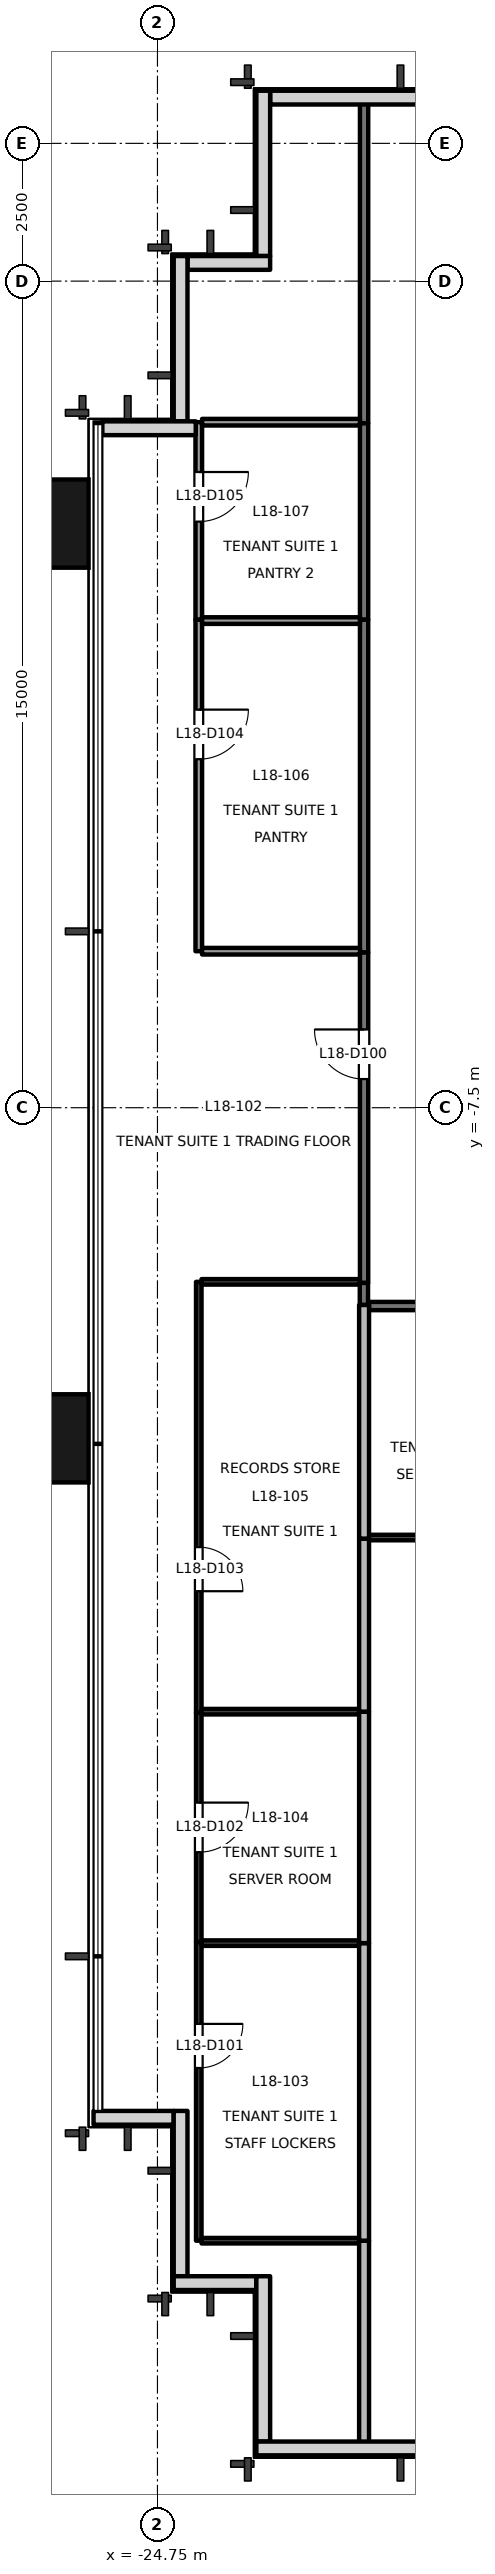
"""IFC4 building model, lengths in metres.
Left out: names, types, materials, properties, quantities, classifications, styles, units other than length and angle.
Written with IfcOpenShell. Run it as: python <this file> out.ifc"""

import sys

from ifc_helpers import new_model, si_unit, direction, frame, frame_2d, origin, origin_2d, place, context, subcontext, project, spatial, rectangle, extrude, element, fill, save


model = new_model("IFC4")
c1 = context("Model", 3, precision=1e-05, world=origin(), true_north=direction((0.0, 1.0)))
c2 = subcontext(c1, "Body", "Model", "MODEL_VIEW")
j1 = project(units=[si_unit("LENGTHUNIT", "METRE"), si_unit("PLANEANGLEUNIT", "RADIAN")], contexts=[c1])
p1 = place(None, origin())
s1 = spatial("IfcSite", under=j1, at=p1, CompositionType="ELEMENT")
p2 = place(p1, origin())
s2 = spatial("IfcBuilding", under=s1, at=p2, CompositionType="ELEMENT")
p3 = place(p2, frame((0.0, 0.0, 83.7)))
s3 = spatial("IfcBuildingStorey", under=s2, at=p3, CompositionType="ELEMENT", Elevation=83.7)
for number, where, z_axis, x_axis in (
    (1, (-26.9, -13.5, -0.2), (0.0, 0.0, 1.0), (0.0, 1.0, 0.0)),
    (2, (-26.9, 3.1, -0.2), (0.0, 0.0, 1.0), (0.0, 1.0, 0.0)),
):
    element("IfcColumn", number, at=place(p3, frame(where, z_axis=z_axis, x_axis=x_axis)), inside=s3, PredefinedType="COLUMN", context=c2, shape_type="SweptSolid", body=[
        extrude(rectangle(XDim=1.6, YDim=1.8, at=origin_2d()), origin(), (0.0, 0.0, 1.0), 4.0),
    ])
p4 = place(p3, frame((-20.0, 10.83, 0.0), z_axis=(0.0, 0.0, 1.0), x_axis=(-1.0, 0.0, 0.0)))
e3 = element("IfcWall", 3, at=p4, inside=s3, PredefinedType="SOLIDWALL", context=c2, shape_type="SweptSolid", body=[
    extrude(rectangle(XDim=2.705, YDim=0.25, at=frame_2d((1.353, 0.0))), origin(), (0.0, 0.0, 1.0), 3.8),
])
p5 = place(p3, frame((-22.83, 10.955, 0.0), z_axis=(0.0, 0.0, 1.0), x_axis=(0.0, -1.0, 0.0)))
e4 = element("IfcWall", 4, at=p5, inside=s3, PredefinedType="SOLIDWALL", context=c2, shape_type="SweptSolid", body=[
    extrude(rectangle(XDim=3.0, YDim=0.25, at=frame_2d((1.5, 0.0))), origin(), (0.0, 0.0, 1.0), 3.8),
])
p6 = place(p3, frame((-22.705, 7.83, 0.0), z_axis=(0.0, 0.0, 1.0), x_axis=(-1.0, 0.0, 0.0)))
e5 = element("IfcWall", 5, at=p6, inside=s3, PredefinedType="SOLIDWALL", context=c2, shape_type="SweptSolid", body=[
    extrude(rectangle(XDim=1.5, YDim=0.25, at=frame_2d((0.75, 0.0))), origin(), (0.0, 0.0, 1.0), 3.8),
])
p7 = place(p3, frame((-24.33, 7.955, 0.0), z_axis=(0.0, 0.0, 1.0), x_axis=(0.0, -1.0, 0.0)))
e6 = element("IfcWall", 6, at=p7, inside=s3, PredefinedType="SOLIDWALL", context=c2, shape_type="SweptSolid", body=[
    extrude(rectangle(XDim=3.0, YDim=0.25, at=frame_2d((1.5, 0.0))), origin(), (0.0, 0.0, 1.0), 3.8),
])
p8 = place(p3, frame((-24.055, 4.83, 0.0), z_axis=(0.0, 0.0, 1.0), x_axis=(-1.0, 0.0, 0.0)))
e7 = element("IfcWall", 7, at=p8, inside=s3, PredefinedType="SOLIDWALL", context=c2, shape_type="SweptSolid", body=[
    extrude(rectangle(XDim=1.695, YDim=0.25, at=frame_2d((0.848, 0.0))), origin(), (0.0, 0.0, 1.0), 3.8),
])
p9 = place(p3, frame((-25.91, -25.83, 0.0), z_axis=(0.0, 0.0, 1.0), x_axis=(1.0, 0.0, 0.0)))
e8 = element("IfcWall", 8, at=p9, inside=s3, PredefinedType="SOLIDWALL", context=c2, shape_type="SweptSolid", body=[
    extrude(rectangle(XDim=1.455, YDim=0.25, at=frame_2d((0.728, 0.0))), origin(), (0.0, 0.0, 1.0), 3.8),
])
p10 = place(p3, frame((-24.33, -25.705, 0.0), z_axis=(0.0, 0.0, 1.0), x_axis=(0.0, -1.0, 0.0)))
e9 = element("IfcWall", 9, at=p10, inside=s3, PredefinedType="SOLIDWALL", context=c2, shape_type="SweptSolid", body=[
    extrude(rectangle(XDim=3.0, YDim=0.25, at=frame_2d((1.5, 0.0))), origin(), (0.0, 0.0, 1.0), 3.8),
])
p11 = place(p3, frame((-24.455, -28.83, 0.0), z_axis=(0.0, 0.0, 1.0), x_axis=(1.0, 0.0, 0.0)))
e10 = element("IfcWall", 10, at=p11, inside=s3, PredefinedType="SOLIDWALL", context=c2, shape_type="SweptSolid", body=[
    extrude(rectangle(XDim=1.5, YDim=0.25, at=frame_2d((0.75, 0.0))), origin(), (0.0, 0.0, 1.0), 3.8),
])
p12 = place(p3, frame((-22.83, -28.705, 0.0), z_axis=(0.0, 0.0, 1.0), x_axis=(0.0, -1.0, 0.0)))
e11 = element("IfcWall", 11, at=p12, inside=s3, PredefinedType="SOLIDWALL", context=c2, shape_type="SweptSolid", body=[
    extrude(rectangle(XDim=3.0, YDim=0.25, at=frame_2d((1.5, 0.0))), origin(), (0.0, 0.0, 1.0), 3.8),
])
p13 = place(p3, frame((-22.955, -31.83, 0.0), z_axis=(0.0, 0.0, 1.0), x_axis=(1.0, 0.0, 0.0)))
e12 = element("IfcWall", 12, at=p13, inside=s3, PredefinedType="SOLIDWALL", context=c2, shape_type="SweptSolid", body=[
    extrude(rectangle(XDim=2.955, YDim=0.25, at=frame_2d((1.478, 0.0))), origin(), (0.0, 0.0, 1.0), 3.8),
])
p14 = place(p3, frame((-21.0, -10.68, 0.0), z_axis=(0.0, 0.0, 1.0), x_axis=(0.0, 1.0, 0.0)))
e13 = element("IfcWall", 13, at=p14, inside=s3, PredefinedType="PARTITIONING", context=c2, shape_type="SweptSolid", body=[
    extrude(rectangle(XDim=6.0, YDim=0.15, at=frame_2d((3.0, 0.0))), origin(), (0.0, 0.0, 1.0), 3.8),
])
p15 = place(p14, frame((3.7, 0.0, 0.0)))
e14 = element("IfcOpeningElement", 14, at=p15, cuts=e13, PredefinedType="OPENING", context=c2, shape_type="SweptSolid", body=[
    extrude(rectangle(XDim=0.9, YDim=2.1, at=frame_2d((0.45, 1.05))), frame((0.0, 0.085, 0.0), z_axis=(0.0, -1.0, 0.0), x_axis=(1.0, 0.0, 0.0)), (0.0, 0.0, 1.0), 0.171),
])
p16 = place(p3, frame((-21.0, 4.92, 0.0), z_axis=(0.0, 0.0, 1.0), x_axis=(0.0, 1.0, 0.0)))
e15 = element("IfcWall", 15, at=p16, inside=s3, PredefinedType="PARTITIONING", context=c2, shape_type="SweptSolid", body=[
    extrude(rectangle(XDim=5.82, YDim=0.15, at=frame_2d((2.91, 0.0))), origin(), (0.0, 0.0, 1.0), 3.8),
])
p17 = place(p3, frame((-21.003, -11.08, 0.0), z_axis=(0.0, 0.0, 1.0), x_axis=(0.0, 1.0, 0.0)))
e16 = element("IfcWall", 16, at=p17, inside=s3, PredefinedType="PARTITIONING", context=c2, shape_type="SweptSolid", body=[
    extrude(rectangle(XDim=0.4, YDim=0.15, at=frame_2d((0.2, 0.0))), origin(), (0.0, 0.0, 1.0), 3.8),
])
p18 = place(p3, frame((-21.0, -4.68, 0.0), z_axis=(0.0, 0.0, 1.0), x_axis=(0.0, 1.0, 0.0)))
e17 = element("IfcWall", 17, at=p18, inside=s3, PredefinedType="PARTITIONING", context=c2, shape_type="SweptSolid", body=[
    extrude(rectangle(XDim=6.04, YDim=0.15, at=frame_2d((3.02, 0.0))), origin(), (0.0, 0.0, 1.0), 3.4),
])
p19 = place(p3, frame((-21.0, 1.36, 0.0), z_axis=(0.0, 0.0, 1.0), x_axis=(0.0, 1.0, 0.0)))
e18 = element("IfcWall", 18, at=p19, inside=s3, PredefinedType="PARTITIONING", context=c2, shape_type="SweptSolid", body=[
    extrude(rectangle(XDim=3.56, YDim=0.15, at=frame_2d((1.78, 0.0))), origin(), (0.0, 0.0, 1.0), 3.4),
])
p20 = place(p3, frame((-18.02, -11.099, 0.0), z_axis=(0.0, 0.0, 1.0), x_axis=(-1.0, 0.0, 0.0)))
e19 = element("IfcWall", 19, at=p20, inside=s3, PredefinedType="PARTITIONING", context=c2, shape_type="SweptSolid", body=[
    extrude(rectangle(XDim=2.89, YDim=0.15, at=frame_2d((1.445, 0.0))), origin(), (0.0, 0.0, 1.0), 3.8),
])
p21 = place(p3, frame((-24.0, -22.64, 0.0), z_axis=(0.0, 0.0, 1.0), x_axis=(0.0, -1.0, 0.0)))
e20 = element("IfcWall", 20, at=p21, inside=s3, PredefinedType="PARTITIONING", context=c2, shape_type="SweptSolid", body=[
    extrude(rectangle(XDim=5.42, YDim=0.1, at=frame_2d((2.71, 0.0))), origin(), (0.0, 0.0, 1.0), 3.8),
])
p22 = place(p21, frame((1.486, 0.0, 0.0)))
e21 = element("IfcOpeningElement", 21, at=p22, cuts=e20, PredefinedType="OPENING", context=c2, shape_type="SweptSolid", body=[
    extrude(rectangle(XDim=0.8, YDim=2.1, at=frame_2d((0.4, 1.05))), frame((0.0, 0.061, 0.0), z_axis=(0.0, -1.0, 0.0), x_axis=(1.0, 0.0, 0.0)), (0.0, 0.0, 1.0), 0.121),
])
p23 = place(p3, frame((-23.95, -28.06, 0.0), z_axis=(0.0, 0.0, 1.0), x_axis=(1.0, 0.0, 0.0)))
e22 = element("IfcWall", 22, at=p23, inside=s3, PredefinedType="PARTITIONING", context=c2, shape_type="SweptSolid", body=[
    extrude(rectangle(XDim=2.86, YDim=0.1, at=frame_2d((1.43, 0.0))), origin(), (0.0, 0.0, 1.0), 3.8),
])
p24 = place(p3, frame((-24.0, -18.48, 0.0), z_axis=(0.0, 0.0, 1.0), x_axis=(0.0, -1.0, 0.0)))
e23 = element("IfcWall", 23, at=p24, inside=s3, PredefinedType="PARTITIONING", context=c2, shape_type="SweptSolid", body=[
    extrude(rectangle(XDim=4.16, YDim=0.1, at=frame_2d((2.08, 0.0))), origin(), (0.0, 0.0, 1.0), 3.8),
])
p25 = place(p24, frame((1.63, 0.0, 0.0)))
e24 = element("IfcOpeningElement", 24, at=p25, cuts=e23, PredefinedType="OPENING", context=c2, shape_type="SweptSolid", body=[
    extrude(rectangle(XDim=0.9, YDim=2.1, at=frame_2d((0.45, 1.05))), frame((0.0, 0.061, 0.0), z_axis=(0.0, -1.0, 0.0), x_axis=(1.0, 0.0, 0.0)), (0.0, 0.0, 1.0), 0.121),
])
p26 = place(p3, frame((-24.0, -10.66, 0.0), z_axis=(0.0, 0.0, 1.0), x_axis=(0.0, -1.0, 0.0)))
e25 = element("IfcWall", 25, at=p26, inside=s3, PredefinedType="PARTITIONING", context=c2, shape_type="SweptSolid", body=[
    extrude(rectangle(XDim=7.82, YDim=0.1, at=frame_2d((3.91, 0.0))), origin(), (0.0, 0.0, 1.0), 3.8),
])
p27 = place(p26, frame((4.814, 0.0, 0.0)))
e26 = element("IfcOpeningElement", 26, at=p27, cuts=e25, PredefinedType="OPENING", context=c2, shape_type="SweptSolid", body=[
    extrude(rectangle(XDim=0.8, YDim=2.1, at=frame_2d((0.4, 1.05))), frame((0.0, 0.061, 0.0), z_axis=(0.0, -1.0, 0.0), x_axis=(1.0, 0.0, 0.0)), (0.0, 0.0, 1.0), 0.121),
])
p28 = place(p3, frame((-21.075, -10.66, 0.0), z_axis=(0.0, 0.0, 1.0), x_axis=(-1.0, 0.0, 0.0)))
e27 = element("IfcWall", 27, at=p28, inside=s3, PredefinedType="PARTITIONING", context=c2, shape_type="SweptSolid", body=[
    extrude(rectangle(XDim=2.875, YDim=0.1, at=frame_2d((1.438, 0.0))), origin(), (0.0, 0.0, 1.0), 3.8),
])
p29 = place(p3, frame((-24.0, 1.36, 0.0), z_axis=(0.0, 0.0, 1.0), x_axis=(0.0, -1.0, 0.0)))
e28 = element("IfcWall", 28, at=p29, inside=s3, PredefinedType="PARTITIONING", context=c2, shape_type="SweptSolid", body=[
    extrude(rectangle(XDim=6.02, YDim=0.12, at=frame_2d((3.01, 0.0))), origin(), (0.0, 0.0, 1.0), 3.4),
])
p30 = place(p29, frame((1.636, 0.0, 0.0)))
e29 = element("IfcOpeningElement", 29, at=p30, cuts=e28, PredefinedType="OPENING", context=c2, shape_type="SweptSolid", body=[
    extrude(rectangle(XDim=0.9, YDim=2.1, at=frame_2d((0.45, 1.05))), frame((0.0, 0.071, 0.0), z_axis=(0.0, -1.0, 0.0), x_axis=(1.0, 0.0, 0.0)), (0.0, 0.0, 1.0), 0.141),
])
p31 = place(p3, frame((-23.94, -4.66, 0.0), z_axis=(0.0, 0.0, 1.0), x_axis=(1.0, 0.0, 0.0)))
e30 = element("IfcWall", 30, at=p31, inside=s3, PredefinedType="PARTITIONING", context=c2, shape_type="SweptSolid", body=[
    extrude(rectangle(XDim=2.865, YDim=0.12, at=frame_2d((1.433, 0.0))), origin(), (0.0, 0.0, 1.0), 3.8),
])
p32 = place(p3, frame((-24.0, 4.94, 0.0), z_axis=(0.0, 0.0, 1.0), x_axis=(0.0, -1.0, 0.0)))
e31 = element("IfcWall", 31, at=p32, inside=s3, PredefinedType="PARTITIONING", context=c2, shape_type="SweptSolid", body=[
    extrude(rectangle(XDim=3.58, YDim=0.12, at=frame_2d((1.79, 0.0))), origin(), (0.0, 0.0, 1.0), 3.4),
])
p33 = place(p32, frame((0.904, 0.0, 0.0)))
e32 = element("IfcOpeningElement", 32, at=p33, cuts=e31, PredefinedType="OPENING", context=c2, shape_type="SweptSolid", body=[
    extrude(rectangle(XDim=0.9, YDim=2.1, at=frame_2d((0.45, 1.05))), frame((0.0, 0.071, 0.0), z_axis=(0.0, -1.0, 0.0), x_axis=(1.0, 0.0, 0.0)), (0.0, 0.0, 1.0), 0.141),
])
p34 = place(p3, frame((-21.075, 4.94, 0.0), z_axis=(0.0, 0.0, 1.0), x_axis=(-1.0, 0.0, 0.0)))
e33 = element("IfcWall", 33, at=p34, inside=s3, PredefinedType="PARTITIONING", context=c2, shape_type="SweptSolid", body=[
    extrude(rectangle(XDim=2.865, YDim=0.12, at=frame_2d((1.433, 0.0))), origin(), (0.0, 0.0, 1.0), 3.8),
])
p35 = place(p3, frame((-21.0, -28.06, 0.0), z_axis=(0.0, 0.0, 1.0), x_axis=(0.0, -1.0, 0.0)))
e34 = element("IfcWall", 34, at=p35, inside=s3, PredefinedType="PARTITIONING", context=c2, shape_type="SweptSolid", body=[
    extrude(rectangle(XDim=3.68, YDim=0.18, at=frame_2d((1.84, 0.0))), origin(), (0.0, 0.0, 1.0), 3.8),
])
p36 = place(p3, frame((-23.95, -22.66, 0.0), z_axis=(0.0, 0.0, 1.0), x_axis=(1.0, 0.0, 0.0)))
e35 = element("IfcWall", 35, at=p36, inside=s3, PredefinedType="PARTITIONING", context=c2, shape_type="SweptSolid", body=[
    extrude(rectangle(XDim=2.86, YDim=0.1, at=frame_2d((1.43, 0.0))), origin(), (0.0, 0.0, 1.0), 3.8),
])
p37 = place(p3, frame((-21.0, -22.66, 0.0), z_axis=(0.0, 0.0, 1.0), x_axis=(0.0, -1.0, 0.0)))
e36 = element("IfcWall", 36, at=p37, inside=s3, PredefinedType="PARTITIONING", context=c2, shape_type="SweptSolid", body=[
    extrude(rectangle(XDim=5.4, YDim=0.18, at=frame_2d((2.7, 0.0))), origin(), (0.0, 0.0, 1.0), 3.8),
])
p38 = place(p3, frame((-23.95, -18.46, 0.0), z_axis=(0.0, 0.0, 1.0), x_axis=(1.0, 0.0, 0.0)))
e37 = element("IfcWall", 37, at=p38, inside=s3, PredefinedType="PARTITIONING", context=c2, shape_type="SweptSolid", body=[
    extrude(rectangle(XDim=2.86, YDim=0.1, at=frame_2d((1.43, 0.0))), origin(), (0.0, 0.0, 1.0), 3.8),
])
p39 = place(p3, frame((-21.0, -18.46, 0.0), z_axis=(0.0, 0.0, 1.0), x_axis=(0.0, -1.0, 0.0)))
e38 = element("IfcWall", 38, at=p39, inside=s3, PredefinedType="PARTITIONING", context=c2, shape_type="SweptSolid", body=[
    extrude(rectangle(XDim=4.2, YDim=0.18, at=frame_2d((2.1, 0.0))), origin(), (0.0, 0.0, 1.0), 3.8),
])
p40 = place(p3, frame((-21.0, -15.32, 0.0), z_axis=(0.0, 0.0, 1.0), x_axis=(0.0, -1.0, 0.0)))
e39 = element("IfcWall", 39, at=p40, inside=s3, PredefinedType="PARTITIONING", context=c2, shape_type="SweptSolid", body=[
    extrude(rectangle(XDim=3.14, YDim=0.18, at=frame_2d((1.57, 0.0))), origin(), (0.0, 0.0, 1.0), 3.8),
])
p41 = place(p3, frame((-21.0, -11.08, 0.0), z_axis=(0.0, 0.0, 1.0), x_axis=(0.0, -1.0, 0.0)))
e40 = element("IfcWall", 40, at=p41, inside=s3, PredefinedType="PARTITIONING", context=c2, shape_type="SweptSolid", body=[
    extrude(rectangle(XDim=4.24, YDim=0.18, at=frame_2d((2.12, 0.0))), origin(), (0.0, 0.0, 1.0), 3.8),
])
p42 = place(p3, frame((-23.94, 1.34, 0.0), z_axis=(0.0, 0.0, 1.0), x_axis=(1.0, 0.0, 0.0)))
e41 = element("IfcWall", 41, at=p42, inside=s3, PredefinedType="PARTITIONING", context=c2, shape_type="SweptSolid", body=[
    extrude(rectangle(XDim=2.865, YDim=0.12, at=frame_2d((1.433, 0.0))), origin(), (0.0, 0.0, 1.0), 3.8),
])
p43 = place(p3, frame((-20.91, -15.3, 0.0), z_axis=(0.0, 0.0, 1.0), x_axis=(1.0, 0.0, 0.0)))
e42 = element("IfcWall", 42, at=p43, inside=s3, PredefinedType="PARTITIONING", context=c2, shape_type="SweptSolid", body=[
    extrude(rectangle(XDim=2.86, YDim=0.1, at=frame_2d((1.43, 0.0))), origin(), (0.0, 0.0, 1.0), 3.8),
])
p44 = place(p15, origin())
e43 = element("IfcDoor", 43, at=p44, inside=s3, OperationType="SINGLE_SWING_RIGHT", PredefinedType="DOOR", context=c2, shape_type="SweptSolid", body=[
    extrude(rectangle(XDim=0.9, YDim=2.1, at=frame_2d((0.45, 1.05))), frame((0.0, 0.025, 0.0), z_axis=(0.0, -1.0, 0.0), x_axis=(1.0, 0.0, 0.0)), (0.0, 0.0, 1.0), 0.05),
])
fill(e14, e43)
p45 = place(p22, origin())
e44 = element("IfcDoor", 44, at=p45, inside=s3, OperationType="SINGLE_SWING_LEFT", PredefinedType="DOOR", context=c2, shape_type="SweptSolid", body=[
    extrude(rectangle(XDim=0.8, YDim=2.1, at=frame_2d((0.4, 1.05))), frame((0.0, 0.025, 0.0), z_axis=(0.0, -1.0, 0.0), x_axis=(1.0, 0.0, 0.0)), (0.0, 0.0, 1.0), 0.05),
])
fill(e21, e44)
p46 = place(p25, origin())
e45 = element("IfcDoor", 45, at=p46, inside=s3, OperationType="SINGLE_SWING_LEFT", PredefinedType="DOOR", context=c2, shape_type="SweptSolid", body=[
    extrude(rectangle(XDim=0.9, YDim=2.1, at=frame_2d((0.45, 1.05))), frame((0.0, 0.025, 0.0), z_axis=(0.0, -1.0, 0.0), x_axis=(1.0, 0.0, 0.0)), (0.0, 0.0, 1.0), 0.05),
])
fill(e24, e45)
p47 = place(p27, origin())
e46 = element("IfcDoor", 46, at=p47, inside=s3, OperationType="SINGLE_SWING_RIGHT", PredefinedType="DOOR", context=c2, shape_type="SweptSolid", body=[
    extrude(rectangle(XDim=0.8, YDim=2.1, at=frame_2d((0.4, 1.05))), frame((0.0, 0.025, 0.0), z_axis=(0.0, -1.0, 0.0), x_axis=(1.0, 0.0, 0.0)), (0.0, 0.0, 1.0), 0.05),
])
fill(e26, e46)
p48 = place(p30, origin())
e47 = element("IfcDoor", 47, at=p48, inside=s3, OperationType="SINGLE_SWING_LEFT", PredefinedType="DOOR", context=c2, shape_type="SweptSolid", body=[
    extrude(rectangle(XDim=0.9, YDim=2.1, at=frame_2d((0.45, 1.05))), frame((0.0, 0.025, 0.0), z_axis=(0.0, -1.0, 0.0), x_axis=(1.0, 0.0, 0.0)), (0.0, 0.0, 1.0), 0.05),
])
fill(e29, e47)
p49 = place(p33, origin())
e48 = element("IfcDoor", 48, at=p49, inside=s3, OperationType="SINGLE_SWING_LEFT", PredefinedType="DOOR", context=c2, shape_type="SweptSolid", body=[
    extrude(rectangle(XDim=0.9, YDim=2.1, at=frame_2d((0.45, 1.05))), frame((0.0, 0.025, 0.0), z_axis=(0.0, -1.0, 0.0), x_axis=(1.0, 0.0, 0.0)), (0.0, 0.0, 1.0), 0.05),
])
fill(e32, e48)
save(model, sys.argv[1])
